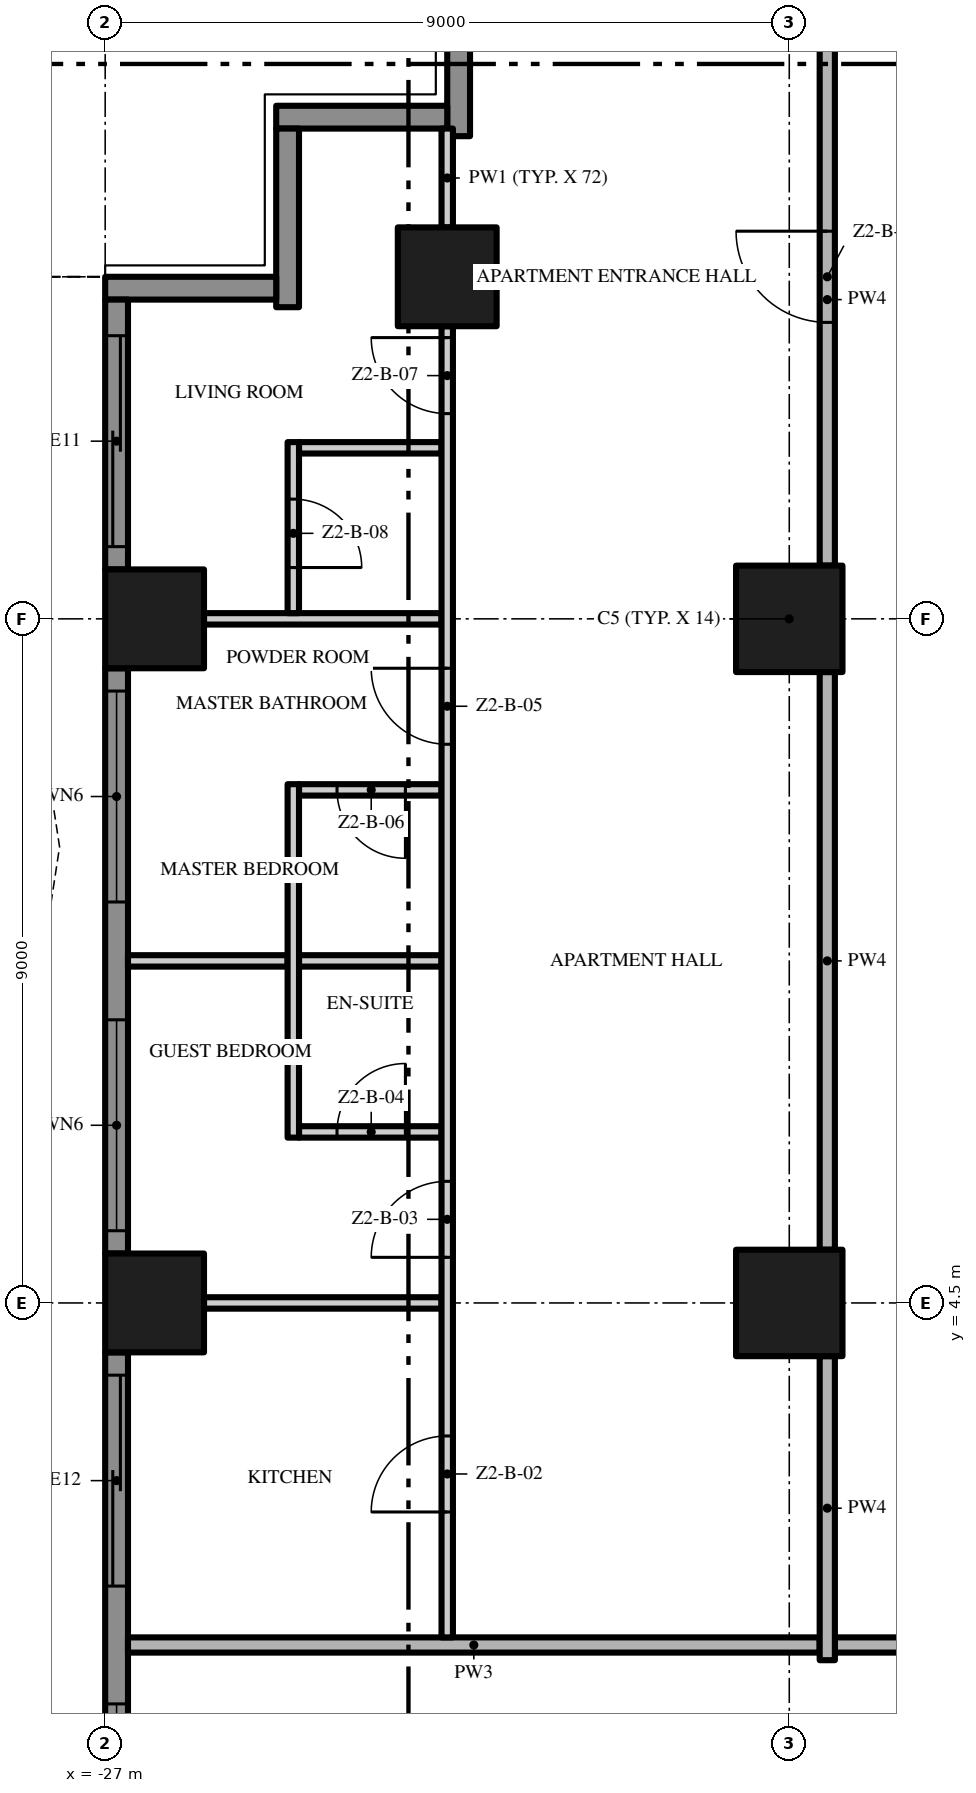
"""IFC4 building model, lengths in metres.
Left out: names, types, materials, properties, quantities, classifications, styles, units other than length and angle.
Written with IfcOpenShell. Run it as: python <this file> out.ifc"""

import sys

from ifc_helpers import new_model, si_unit, direction, frame, frame_2d, origin, origin_2d, place, context, subcontext, project, spatial, polyline, rectangle, outline, extrude, element, fill, save


model = new_model("IFC4")
c1 = context("Model", 3, precision=1e-05, world=origin(), true_north=direction((0.0, 1.0)))
c2 = subcontext(c1, "Body", "Model", "MODEL_VIEW")
j1 = project(units=[si_unit("LENGTHUNIT", "METRE"), si_unit("PLANEANGLEUNIT", "RADIAN")], contexts=[c1])
p1 = place(None, origin())
s1 = spatial("IfcSite", under=j1, at=p1, CompositionType="ELEMENT")
p2 = place(p1, origin())
s2 = spatial("IfcBuilding", under=s1, at=p2, CompositionType="ELEMENT")
p3 = place(p2, frame((0.0, 0.0, 84.6)))
s3 = spatial("IfcBuildingStorey", under=s2, at=p3, CompositionType="ELEMENT", Elevation=84.6)
for number, where, z_axis, x_axis in (
    (1, (-18.0, 13.5, 0.0), (0.0, 0.0, 1.0), (1.0, 0.0, 0.0)),
    (2, (-18.0, 4.5, 0.0), (0.0, 0.0, 1.0), (1.0, 0.0, 0.0)),
):
    element("IfcColumn", number, at=place(p3, frame(where, z_axis=z_axis, x_axis=x_axis)), inside=s3, PredefinedType="COLUMN", context=c2, shape_type="SweptSolid", body=[
        extrude(rectangle(XDim=1.4, YDim=1.4, at=origin_2d()), origin(), (0.0, 0.0, 1.0), 3.5),
    ])
for number, where, z_axis, x_axis in (
    (3, (-26.35, 13.5, 0.0), (0.0, 0.0, 1.0), (1.0, 0.0, 0.0)),
    (4, (-22.5, 18.0, 0.0), (0.0, 0.0, 1.0), (1.0, 0.0, 0.0)),
    (5, (-26.35, 4.5, 0.0), (0.0, 0.0, 1.0), (1.0, 0.0, 0.0)),
):
    element("IfcColumn", number, at=place(p3, frame(where, z_axis=z_axis, x_axis=x_axis)), inside=s3, PredefinedType="COLUMN", context=c2, shape_type="SweptSolid", body=[
        extrude(rectangle(XDim=1.3, YDim=1.3, at=origin_2d()), origin(), (0.0, 0.0, 1.0), 3.5),
    ])
p4 = place(p3, frame((-22.35, 19.85, 0.0), z_axis=(0.0, 0.0, 1.0), x_axis=(0.0, 1.0, 0.0)))
e6 = element("IfcWall", 6, at=p4, inside=s3, PredefinedType="SOLIDWALL", context=c2, shape_type="SweptSolid", body=[
    extrude(rectangle(XDim=2.35, YDim=0.3, at=frame_2d((1.175, 0.0))), origin(), (0.0, 0.0, 1.0), 3.5),
])
p5 = place(p3, frame((-24.75, 20.1, 0.0), z_axis=(0.0, 0.0, 1.0), x_axis=(1.0, 0.0, 0.0)))
e7 = element("IfcWall", 7, at=p5, inside=s3, PredefinedType="SOLIDWALL", context=c2, shape_type="SweptSolid", body=[
    extrude(rectangle(XDim=2.25, YDim=0.3, at=frame_2d((1.125, 0.0))), origin(), (0.0, 0.0, 1.0), 3.5),
])
p6 = place(p3, frame((-24.6, 17.6, 0.0), z_axis=(0.0, 0.0, 1.0), x_axis=(0.0, 1.0, 0.0)))
e8 = element("IfcWall", 8, at=p6, inside=s3, PredefinedType="SOLIDWALL", context=c2, shape_type="SweptSolid", body=[
    extrude(rectangle(XDim=2.35, YDim=0.3, at=frame_2d((1.175, 0.0))), origin(), (0.0, 0.0, 1.0), 3.5),
])
p7 = place(p3, frame((-27.0, 17.85, 0.0), z_axis=(0.0, 0.0, 1.0), x_axis=(1.0, 0.0, 0.0)))
e9 = element("IfcWall", 9, at=p7, inside=s3, PredefinedType="SOLIDWALL", context=c2, shape_type="SweptSolid", body=[
    extrude(rectangle(XDim=2.25, YDim=0.3, at=frame_2d((1.125, 0.0))), origin(), (0.0, 0.0, 1.0), 3.5),
])
p8 = place(p3, frame((-26.85, 14.15, 0.0), z_axis=(0.0, 0.0, 1.0), x_axis=(0.0, 1.0, 0.0)))
e10 = element("IfcWall", 10, at=p8, inside=s3, PredefinedType="SOLIDWALL", context=c2, shape_type="SweptSolid", body=[
    extrude(rectangle(XDim=3.55, YDim=0.3, at=frame_2d((1.775, 0.0))), origin(), (0.0, 0.0, 1.0), 3.5),
])
p9 = place(p8, frame((0.3, 0.0, 0.0)))
e11 = element("IfcOpeningElement", 11, at=p9, cuts=e10, PredefinedType="OPENING", context=c2, shape_type="SweptSolid", body=[
    extrude(rectangle(XDim=2.775, YDim=2.4, at=frame_2d((1.387, 1.2))), frame((0.0, 0.16, 0.0), z_axis=(0.0, -1.0, 0.0), x_axis=(1.0, 0.0, 0.0)), (0.0, 0.0, 1.0), 0.32),
])
p10 = place(p3, frame((-26.85, 5.15, 0.0), z_axis=(0.0, 0.0, 1.0), x_axis=(0.0, 1.0, 0.0)))
e12 = element("IfcWall", 12, at=p10, inside=s3, PredefinedType="SOLIDWALL", context=c2, shape_type="SweptSolid", body=[
    extrude(rectangle(XDim=7.7, YDim=0.3, at=frame_2d((3.85, 0.0))), origin(), (0.0, 0.0, 1.0), 3.5),
])
p11 = place(p10, frame((4.625, 0.0, 0.45)))
e13 = element("IfcOpeningElement", 13, at=p11, cuts=e12, PredefinedType="OPENING", context=c2, shape_type="SweptSolid", body=[
    extrude(rectangle(XDim=2.775, YDim=2.65, at=frame_2d((1.387, 1.325))), frame((0.0, 0.16, 0.0), z_axis=(0.0, -1.0, 0.0), x_axis=(1.0, 0.0, 0.0)), (0.0, 0.0, 1.0), 0.32),
])
p12 = place(p10, frame((0.3, 0.0, 0.45)))
e14 = element("IfcOpeningElement", 14, at=p12, cuts=e12, PredefinedType="OPENING", context=c2, shape_type="SweptSolid", body=[
    extrude(rectangle(XDim=2.775, YDim=2.65, at=frame_2d((1.387, 1.325))), frame((0.0, 0.16, 0.0), z_axis=(0.0, -1.0, 0.0), x_axis=(1.0, 0.0, 0.0)), (0.0, 0.0, 1.0), 0.32),
])
p13 = place(p3, frame((-26.85, -3.85, 0.0), z_axis=(0.0, 0.0, 1.0), x_axis=(0.0, 1.0, 0.0)))
e15 = element("IfcWall", 15, at=p13, inside=s3, PredefinedType="SOLIDWALL", context=c2, shape_type="SweptSolid", body=[
    extrude(rectangle(XDim=7.7, YDim=0.3, at=frame_2d((3.85, 0.0))), origin(), (0.0, 0.0, 1.0), 3.5),
])
p14 = place(p13, frame((4.625, 0.0, 0.0)))
e16 = element("IfcOpeningElement", 16, at=p14, cuts=e15, PredefinedType="OPENING", context=c2, shape_type="SweptSolid", body=[
    extrude(rectangle(XDim=2.775, YDim=2.4, at=frame_2d((1.387, 1.2))), frame((0.0, 0.16, 0.0), z_axis=(0.0, -1.0, 0.0), x_axis=(1.0, 0.0, 0.0)), (0.0, 0.0, 1.0), 0.32),
])
p15 = place(p13, frame((0.3, 0.0, 0.45)))
e17 = element("IfcOpeningElement", 17, at=p15, cuts=e15, PredefinedType="OPENING", context=c2, shape_type="SweptSolid", body=[
    extrude(rectangle(XDim=2.775, YDim=2.65, at=frame_2d((1.387, 1.325))), frame((0.0, 0.16, 0.0), z_axis=(0.0, -1.0, 0.0), x_axis=(1.0, 0.0, 0.0)), (0.0, 0.0, 1.0), 0.32),
])
p16 = place(p3, origin())
e18 = element("IfcWall", 18, at=p16, inside=s3, PredefinedType="USERDEFINED", context=c2, shape_type="SweptSolid", body=[
    extrude(outline(polyline([(-30.0, 18.0), (-29.771, 16.5), (-29.171, 15.0), (-28.429, 13.5), (-27.829, 12.0), (-27.6, 10.5), (-27.829, 9.0), (-28.429, 7.5), (-29.171, 6.0), (-29.771, 4.5), (-30.0, 3.0), (-29.771, 1.5), (-29.171, 0.0), (-28.429, -1.5), (-27.829, -3.0), (-27.6, -4.5), (-27.829, -6.0), (-28.429, -7.5), (-29.171, -9.0), (-29.771, -10.5), (-30.0, -12.0), (-29.771, -13.5), (-29.171, -15.0), (-28.429, -16.5), (-27.829, -18.0), (-27.597, -17.907), (-28.201, -16.398), (-28.942, -14.898), (-29.528, -13.434), (-29.747, -12.0), (-29.528, -10.566), (-28.942, -9.102), (-28.201, -7.602), (-27.586, -6.066), (-27.347, -4.5), (-27.586, -2.934), (-28.201, -1.398), (-28.942, 0.102), (-29.528, 1.566), (-29.747, 3.0), (-29.528, 4.434), (-28.942, 5.898), (-28.201, 7.398), (-27.586, 8.934), (-27.347, 10.5), (-27.586, 12.066), (-28.201, 13.602), (-28.942, 15.102), (-29.528, 16.566), (-29.753, 18.038), (-30.0, 18.0)])), origin(), (0.0, 0.0, 1.0), 0.9),
])
p17 = place(p3, frame((-0.1, 0.0, 0.0), z_axis=(0.0, 0.0, 1.0), x_axis=(-1.0, 0.0, 0.0)))
e19 = element("IfcWall", 19, at=p17, inside=s3, PredefinedType="PARTITIONING", context=c2, shape_type="SweptSolid", body=[
    extrude(rectangle(XDim=17.3, YDim=0.2, at=frame_2d((8.65, 0.0))), origin(), (0.0, 0.0, 1.0), 3.5),
])
p18 = place(p17, frame((8.15, 0.0, 0.0)))
e20 = element("IfcOpeningElement", 20, at=p18, cuts=e19, PredefinedType="OPENING", context=c2, shape_type="SweptSolid", body=[
    extrude(rectangle(XDim=1.5, YDim=2.4, at=frame_2d((0.75, 1.2))), frame((0.0, 0.11, 0.0), z_axis=(0.0, -1.0, 0.0), x_axis=(1.0, 0.0, 0.0)), (0.0, 0.0, 1.0), 0.22),
])
p19 = place(p3, frame((-26.7, 0.0, 0.0), z_axis=(0.0, 0.0, 1.0), x_axis=(1.0, 0.0, 0.0)))
e21 = element("IfcWall", 21, at=p19, inside=s3, PredefinedType="PARTITIONING", context=c2, shape_type="SweptSolid", body=[
    extrude(rectangle(XDim=9.1, YDim=0.2, at=frame_2d((4.55, 0.0))), origin(), (0.0, 0.0, 1.0), 3.5),
])
p20 = place(p3, frame((-25.7, 4.5, 0.0), z_axis=(0.0, 0.0, 1.0), x_axis=(1.0, 0.0, 0.0)))
e22 = element("IfcWall", 22, at=p20, inside=s3, PredefinedType="PARTITIONING", context=c2, shape_type="SweptSolid", body=[
    extrude(rectangle(XDim=3.125, YDim=0.15, at=frame_2d((1.562, 0.0))), origin(), (0.0, 0.0, 1.0), 3.5),
])
p21 = place(p3, frame((-24.45, 6.75, 0.0), z_axis=(0.0, 0.0, 1.0), x_axis=(1.0, 0.0, 0.0)))
e23 = element("IfcWall", 23, at=p21, inside=s3, PredefinedType="PARTITIONING", context=c2, shape_type="SweptSolid", body=[
    extrude(rectangle(XDim=1.875, YDim=0.15, at=frame_2d((0.938, 0.0))), origin(), (0.0, 0.0, 1.0), 3.5),
])
p22 = place(p21, frame((0.5, 0.0, 0.0)))
e24 = element("IfcOpeningElement", 24, at=p22, cuts=e23, PredefinedType="OPENING", context=c2, shape_type="SweptSolid", body=[
    extrude(rectangle(XDim=0.9, YDim=2.1, at=frame_2d((0.45, 1.05))), frame((0.0, 0.085, 0.0), z_axis=(0.0, -1.0, 0.0), x_axis=(1.0, 0.0, 0.0)), (0.0, 0.0, 1.0), 0.17),
])
p23 = place(p3, frame((-26.7, 9.0, 0.0), z_axis=(0.0, 0.0, 1.0), x_axis=(1.0, 0.0, 0.0)))
e25 = element("IfcWall", 25, at=p23, inside=s3, PredefinedType="PARTITIONING", context=c2, shape_type="SweptSolid", body=[
    extrude(rectangle(XDim=2.1, YDim=0.15, at=frame_2d((1.05, 0.0))), origin(), (0.0, 0.0, 1.0), 3.5),
])
p24 = place(p3, frame((-24.45, 9.0, 0.0), z_axis=(0.0, 0.0, 1.0), x_axis=(1.0, 0.0, 0.0)))
e26 = element("IfcWall", 26, at=p24, inside=s3, PredefinedType="PARTITIONING", context=c2, shape_type="SweptSolid", body=[
    extrude(rectangle(XDim=1.875, YDim=0.15, at=frame_2d((0.938, 0.0))), origin(), (0.0, 0.0, 1.0), 3.5),
])
p25 = place(p3, frame((-22.575, 11.25, 0.0), z_axis=(0.0, 0.0, 1.0), x_axis=(-1.0, 0.0, 0.0)))
e27 = element("IfcWall", 27, at=p25, inside=s3, PredefinedType="PARTITIONING", context=c2, shape_type="SweptSolid", body=[
    extrude(rectangle(XDim=1.875, YDim=0.15, at=frame_2d((0.938, 0.0))), origin(), (0.0, 0.0, 1.0), 3.5),
])
p26 = place(p25, frame((0.475, 0.0, 0.0)))
e28 = element("IfcOpeningElement", 28, at=p26, cuts=e27, PredefinedType="OPENING", context=c2, shape_type="SweptSolid", body=[
    extrude(rectangle(XDim=0.9, YDim=2.1, at=frame_2d((0.45, 1.05))), frame((0.0, 0.085, 0.0), z_axis=(0.0, -1.0, 0.0), x_axis=(1.0, 0.0, 0.0)), (0.0, 0.0, 1.0), 0.17),
])
p27 = place(p3, frame((-25.7, 13.5, 0.0), z_axis=(0.0, 0.0, 1.0), x_axis=(1.0, 0.0, 0.0)))
e29 = element("IfcWall", 29, at=p27, inside=s3, PredefinedType="PARTITIONING", context=c2, shape_type="SweptSolid", body=[
    extrude(rectangle(XDim=3.125, YDim=0.15, at=frame_2d((1.562, 0.0))), origin(), (0.0, 0.0, 1.0), 3.5),
])
p28 = place(p3, frame((-24.45, 15.75, 0.0), z_axis=(0.0, 0.0, 1.0), x_axis=(1.0, 0.0, 0.0)))
e30 = element("IfcWall", 30, at=p28, inside=s3, PredefinedType="PARTITIONING", context=c2, shape_type="SweptSolid", body=[
    extrude(rectangle(XDim=1.875, YDim=0.15, at=frame_2d((0.938, 0.0))), origin(), (0.0, 0.0, 1.0), 3.5),
])
p29 = place(p3, frame((-24.525, 6.675, 0.0), z_axis=(0.0, 0.0, 1.0), x_axis=(0.0, 1.0, 0.0)))
e31 = element("IfcWall", 31, at=p29, inside=s3, PredefinedType="PARTITIONING", context=c2, shape_type="SweptSolid", body=[
    extrude(rectangle(XDim=4.65, YDim=0.15, at=frame_2d((2.325, 0.0))), origin(), (0.0, 0.0, 1.0), 3.5),
])
p30 = place(p3, frame((-24.525, 15.825, 0.0), z_axis=(0.0, 0.0, 1.0), x_axis=(0.0, -1.0, 0.0)))
e32 = element("IfcWall", 32, at=p30, inside=s3, PredefinedType="PARTITIONING", context=c2, shape_type="SweptSolid", body=[
    extrude(rectangle(XDim=2.25, YDim=0.15, at=frame_2d((1.125, 0.0))), origin(), (0.0, 0.0, 1.0), 3.5),
])
p31 = place(p30, frame((0.75, 0.0, 0.0)))
e33 = element("IfcOpeningElement", 33, at=p31, cuts=e32, PredefinedType="OPENING", context=c2, shape_type="SweptSolid", body=[
    extrude(rectangle(XDim=0.9, YDim=2.1, at=frame_2d((0.45, 1.05))), frame((0.0, 0.085, 0.0), z_axis=(0.0, -1.0, 0.0), x_axis=(1.0, 0.0, 0.0)), (0.0, 0.0, 1.0), 0.17),
])
p32 = place(p3, frame((-22.5, 0.1, 0.0), z_axis=(0.0, 0.0, 1.0), x_axis=(0.0, 1.0, 0.0)))
e34 = element("IfcWall", 34, at=p32, inside=s3, PredefinedType="PARTITIONING", context=c2, shape_type="SweptSolid", body=[
    extrude(rectangle(XDim=17.25, YDim=0.15, at=frame_2d((8.625, 0.0))), origin(), (0.0, 0.0, 1.0), 3.5),
])
p33 = place(p32, frame((1.65, 0.0, 0.0)))
e35 = element("IfcOpeningElement", 35, at=p33, cuts=e34, PredefinedType="OPENING", context=c2, shape_type="SweptSolid", body=[
    extrude(rectangle(XDim=1.0, YDim=2.4, at=frame_2d((0.5, 1.2))), frame((0.0, 0.085, 0.0), z_axis=(0.0, -1.0, 0.0), x_axis=(1.0, 0.0, 0.0)), (0.0, 0.0, 1.0), 0.17),
])
p34 = place(p32, frame((5.0, 0.0, 0.0)))
e36 = element("IfcOpeningElement", 36, at=p34, cuts=e34, PredefinedType="OPENING", context=c2, shape_type="SweptSolid", body=[
    extrude(rectangle(XDim=1.0, YDim=2.4, at=frame_2d((0.5, 1.2))), frame((0.0, 0.085, 0.0), z_axis=(0.0, -1.0, 0.0), x_axis=(1.0, 0.0, 0.0)), (0.0, 0.0, 1.0), 0.17),
])
p35 = place(p32, frame((11.75, 0.0, 0.0)))
e37 = element("IfcOpeningElement", 37, at=p35, cuts=e34, PredefinedType="OPENING", context=c2, shape_type="SweptSolid", body=[
    extrude(rectangle(XDim=1.0, YDim=2.4, at=frame_2d((0.5, 1.2))), frame((0.0, 0.085, 0.0), z_axis=(0.0, -1.0, 0.0), x_axis=(1.0, 0.0, 0.0)), (0.0, 0.0, 1.0), 0.17),
])
p36 = place(p32, frame((16.1, 0.0, 0.0)))
e38 = element("IfcOpeningElement", 38, at=p36, cuts=e34, PredefinedType="OPENING", context=c2, shape_type="SweptSolid", body=[
    extrude(rectangle(XDim=1.0, YDim=2.4, at=frame_2d((0.5, 1.2))), frame((0.0, 0.085, 0.0), z_axis=(0.0, -1.0, 0.0), x_axis=(1.0, 0.0, 0.0)), (0.0, 0.0, 1.0), 0.17),
])
p37 = place(p3, frame((-22.5, 18.65, 0.0), z_axis=(0.0, 0.0, 1.0), x_axis=(0.0, 1.0, 0.0)))
e39 = element("IfcWall", 39, at=p37, inside=s3, PredefinedType="PARTITIONING", context=c2, shape_type="SweptSolid", body=[
    extrude(rectangle(XDim=1.3, YDim=0.15, at=frame_2d((0.65, 0.0))), origin(), (0.0, 0.0, 1.0), 3.5),
])
p38 = place(p3, frame((-17.5, -0.2, 0.0), z_axis=(0.0, 0.0, 1.0), x_axis=(0.0, 1.0, 0.0)))
e40 = element("IfcWall", 40, at=p38, inside=s3, PredefinedType="PARTITIONING", context=c2, shape_type="SweptSolid", body=[
    extrude(rectangle(XDim=4.0, YDim=0.2, at=frame_2d((2.0, 0.0))), origin(), (0.0, 0.0, 1.0), 3.5),
])
p39 = place(p3, frame((-17.5, 5.2, 0.0), z_axis=(0.0, 0.0, 1.0), x_axis=(0.0, 1.0, 0.0)))
e41 = element("IfcWall", 41, at=p39, inside=s3, PredefinedType="PARTITIONING", context=c2, shape_type="SweptSolid", body=[
    extrude(rectangle(XDim=7.6, YDim=0.2, at=frame_2d((3.8, 0.0))), origin(), (0.0, 0.0, 1.0), 3.5),
])
p40 = place(p3, frame((-17.5, 14.2, 0.0), z_axis=(0.0, 0.0, 1.0), x_axis=(0.0, 1.0, 0.0)))
e42 = element("IfcWall", 42, at=p40, inside=s3, PredefinedType="PARTITIONING", context=c2, shape_type="SweptSolid", body=[
    extrude(rectangle(XDim=7.0, YDim=0.2, at=frame_2d((3.5, 0.0))), origin(), (0.0, 0.0, 1.0), 3.5),
])
p41 = place(p40, frame((3.2, 0.0, 0.0)))
e43 = element("IfcOpeningElement", 43, at=p41, cuts=e42, PredefinedType="OPENING", context=c2, shape_type="SweptSolid", body=[
    extrude(rectangle(XDim=1.2, YDim=2.4, at=frame_2d((0.6, 1.2))), frame((0.0, 0.11, 0.0), z_axis=(0.0, -1.0, 0.0), x_axis=(1.0, 0.0, 0.0)), (0.0, 0.0, 1.0), 0.22),
])
p42 = place(p9, origin())
e44 = element("IfcDoor", 44, at=p42, inside=s3, OperationType="SINGLE_SWING_LEFT", PredefinedType="DOOR", context=c2, shape_type="SweptSolid", body=[
    extrude(rectangle(XDim=2.775, YDim=2.4, at=frame_2d((1.387, 1.2))), frame((0.0, 0.025, 0.0), z_axis=(0.0, -1.0, 0.0), x_axis=(1.0, 0.0, 0.0)), (0.0, 0.0, 1.0), 0.05),
])
fill(e11, e44)
p43 = place(p11, origin())
e45 = element("IfcWindow", 45, at=p43, inside=s3, PartitioningType="SINGLE_PANEL", PredefinedType="WINDOW", context=c2, shape_type="SweptSolid", body=[
    extrude(rectangle(XDim=2.775, YDim=2.65, at=frame_2d((1.387, 1.325))), frame((0.0, 0.03, 0.0), z_axis=(0.0, -1.0, 0.0), x_axis=(1.0, 0.0, 0.0)), (0.0, 0.0, 1.0), 0.06),
])
fill(e13, e45)
p44 = place(p12, origin())
e46 = element("IfcWindow", 46, at=p44, inside=s3, PartitioningType="SINGLE_PANEL", PredefinedType="WINDOW", context=c2, shape_type="SweptSolid", body=[
    extrude(rectangle(XDim=2.775, YDim=2.65, at=frame_2d((1.387, 1.325))), frame((0.0, 0.03, 0.0), z_axis=(0.0, -1.0, 0.0), x_axis=(1.0, 0.0, 0.0)), (0.0, 0.0, 1.0), 0.06),
])
fill(e14, e46)
p45 = place(p14, origin())
e47 = element("IfcDoor", 47, at=p45, inside=s3, OperationType="SINGLE_SWING_LEFT", PredefinedType="DOOR", context=c2, shape_type="SweptSolid", body=[
    extrude(rectangle(XDim=2.775, YDim=2.4, at=frame_2d((1.387, 1.2))), frame((0.0, 0.025, 0.0), z_axis=(0.0, -1.0, 0.0), x_axis=(1.0, 0.0, 0.0)), (0.0, 0.0, 1.0), 0.05),
])
fill(e16, e47)
p46 = place(p15, origin())
e48 = element("IfcWindow", 48, at=p46, inside=s3, PartitioningType="SINGLE_PANEL", PredefinedType="WINDOW", context=c2, shape_type="SweptSolid", body=[
    extrude(rectangle(XDim=2.775, YDim=2.65, at=frame_2d((1.387, 1.325))), frame((0.0, 0.03, 0.0), z_axis=(0.0, -1.0, 0.0), x_axis=(1.0, 0.0, 0.0)), (0.0, 0.0, 1.0), 0.06),
])
fill(e17, e48)
p47 = place(p41, origin())
e49 = element("IfcDoor", 49, at=p47, inside=s3, OperationType="SINGLE_SWING_RIGHT", PredefinedType="DOOR", context=c2, shape_type="SweptSolid", body=[
    extrude(rectangle(XDim=1.2, YDim=2.4, at=frame_2d((0.6, 1.2))), frame((0.0, 0.025, 0.0), z_axis=(0.0, -1.0, 0.0), x_axis=(1.0, 0.0, 0.0)), (0.0, 0.0, 1.0), 0.05),
])
fill(e43, e49)
p48 = place(p33, origin())
e50 = element("IfcDoor", 50, at=p48, inside=s3, OperationType="SINGLE_SWING_LEFT", PredefinedType="DOOR", context=c2, shape_type="SweptSolid", body=[
    extrude(rectangle(XDim=1.0, YDim=2.4, at=frame_2d((0.5, 1.2))), frame((0.0, 0.025, 0.0), z_axis=(0.0, -1.0, 0.0), x_axis=(1.0, 0.0, 0.0)), (0.0, 0.0, 1.0), 0.05),
])
fill(e35, e50)
p49 = place(p34, origin())
e51 = element("IfcDoor", 51, at=p49, inside=s3, OperationType="SINGLE_SWING_LEFT", PredefinedType="DOOR", context=c2, shape_type="SweptSolid", body=[
    extrude(rectangle(XDim=1.0, YDim=2.4, at=frame_2d((0.5, 1.2))), frame((0.0, 0.025, 0.0), z_axis=(0.0, -1.0, 0.0), x_axis=(1.0, 0.0, 0.0)), (0.0, 0.0, 1.0), 0.05),
])
fill(e36, e51)
p50 = place(p22, origin())
e52 = element("IfcDoor", 52, at=p50, inside=s3, OperationType="SINGLE_SWING_RIGHT", PredefinedType="DOOR", context=c2, shape_type="SweptSolid", body=[
    extrude(rectangle(XDim=0.9, YDim=2.1, at=frame_2d((0.45, 1.05))), frame((0.0, 0.025, 0.0), z_axis=(0.0, -1.0, 0.0), x_axis=(1.0, 0.0, 0.0)), (0.0, 0.0, 1.0), 0.05),
])
fill(e24, e52)
p51 = place(p35, origin())
e53 = element("IfcDoor", 53, at=p51, inside=s3, OperationType="SINGLE_SWING_RIGHT", PredefinedType="DOOR", context=c2, shape_type="SweptSolid", body=[
    extrude(rectangle(XDim=1.0, YDim=2.4, at=frame_2d((0.5, 1.2))), frame((0.0, 0.025, 0.0), z_axis=(0.0, -1.0, 0.0), x_axis=(1.0, 0.0, 0.0)), (0.0, 0.0, 1.0), 0.05),
])
fill(e37, e53)
p52 = place(p26, origin())
e54 = element("IfcDoor", 54, at=p52, inside=s3, OperationType="SINGLE_SWING_LEFT", PredefinedType="DOOR", context=c2, shape_type="SweptSolid", body=[
    extrude(rectangle(XDim=0.9, YDim=2.1, at=frame_2d((0.45, 1.05))), frame((0.0, 0.025, 0.0), z_axis=(0.0, -1.0, 0.0), x_axis=(1.0, 0.0, 0.0)), (0.0, 0.0, 1.0), 0.05),
])
fill(e28, e54)
p53 = place(p36, origin())
e55 = element("IfcDoor", 55, at=p53, inside=s3, OperationType="SINGLE_SWING_RIGHT", PredefinedType="DOOR", context=c2, shape_type="SweptSolid", body=[
    extrude(rectangle(XDim=1.0, YDim=2.4, at=frame_2d((0.5, 1.2))), frame((0.0, 0.025, 0.0), z_axis=(0.0, -1.0, 0.0), x_axis=(1.0, 0.0, 0.0)), (0.0, 0.0, 1.0), 0.05),
])
fill(e38, e55)
p54 = place(p31, origin())
e56 = element("IfcDoor", 56, at=p54, inside=s3, OperationType="SINGLE_SWING_RIGHT", PredefinedType="DOOR", context=c2, shape_type="SweptSolid", body=[
    extrude(rectangle(XDim=0.9, YDim=2.1, at=frame_2d((0.45, 1.05))), frame((0.0, 0.025, 0.0), z_axis=(0.0, -1.0, 0.0), x_axis=(1.0, 0.0, 0.0)), (0.0, 0.0, 1.0), 0.05),
])
fill(e33, e56)
save(model, sys.argv[1])
